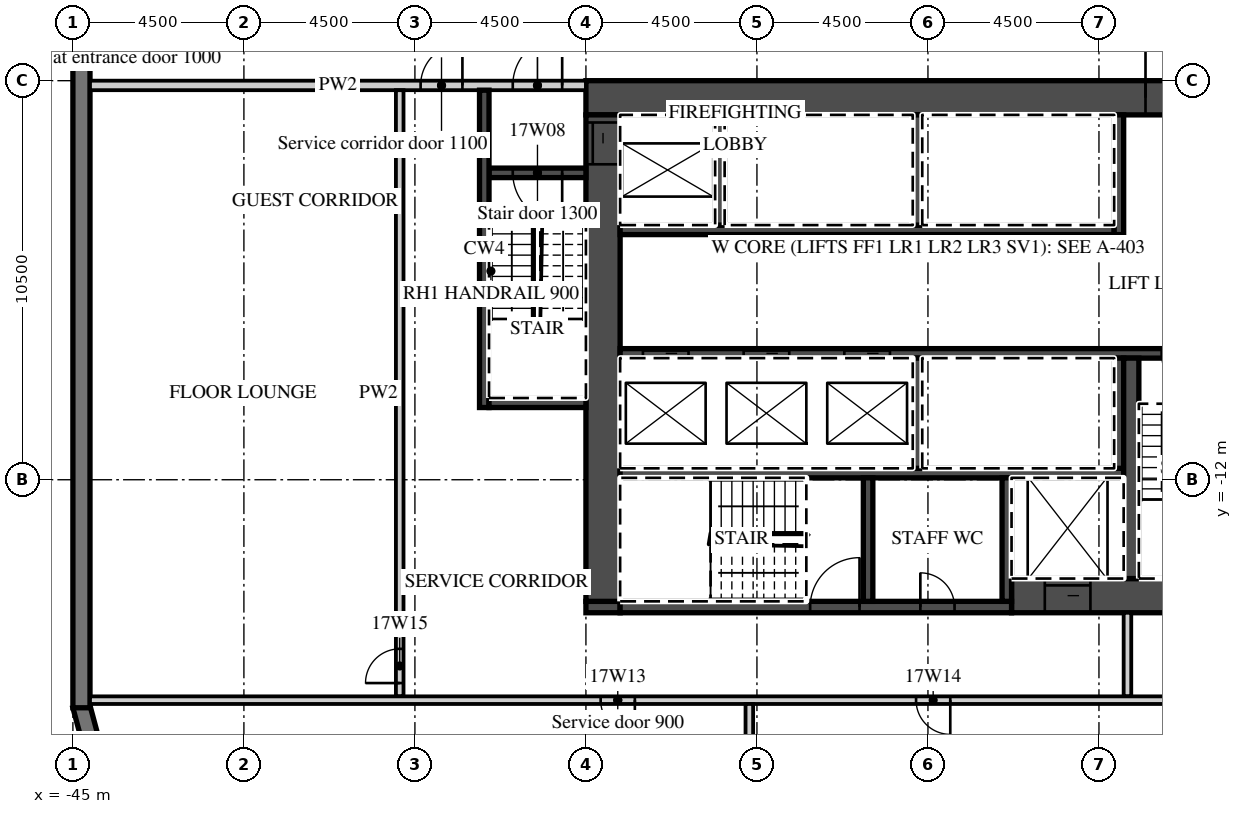
"""IFC4 building model, lengths in metres.
Left out: names, types, materials, properties, quantities, classifications, styles, units other than length and angle.
Written with IfcOpenShell. Run it as: python <this file> out.ifc"""

import sys

from ifc_helpers import new_model, si_unit, direction, frame, frame_2d, origin, place, context, subcontext, project, spatial, polyline, rectangle, outline, extrude, element, fill, save


model = new_model("IFC4")
c1 = context("Model", 3, precision=1e-05, world=origin(), true_north=direction((0.0, 1.0)))
c2 = subcontext(c1, "Body", "Model", "MODEL_VIEW")
j1 = project(units=[si_unit("LENGTHUNIT", "METRE"), si_unit("PLANEANGLEUNIT", "RADIAN")], contexts=[c1])
p1 = place(None, origin())
s1 = spatial("IfcSite", under=j1, at=p1, CompositionType="ELEMENT")
p2 = place(p1, origin())
s2 = spatial("IfcBuilding", under=s1, at=p2, CompositionType="ELEMENT")
p3 = place(p2, frame((0.0, 0.0, 86.4)))
s3 = spatial("IfcBuildingStorey", under=s2, at=p3, CompositionType="ELEMENT", Elevation=86.4)
p4 = place(p3, frame((-44.783, -17.942, 0.0), z_axis=(0.0, 0.0, 1.0), x_axis=(0.25881466832, -0.965926999034, 0.0)))
e1 = element("IfcWall", 1, at=p4, inside=s3, PredefinedType="SOLIDWALL", context=c2, shape_type="SweptSolid", body=[
    extrude(outline(polyline([(0.0, -0.225), (2.071, -0.225), (1.95, 0.225), (0.121, 0.225), (0.0, -0.225)])), origin(), (0.0, 0.0, 1.0), 3.02),
])
p5 = place(p3, frame((-44.775, 18.0, 0.0), z_axis=(0.0, 0.0, 1.0), x_axis=(0.0, -1.0, 0.0)))
e2 = element("IfcWall", 2, at=p5, inside=s3, PredefinedType="SOLIDWALL", context=c2, shape_type="SweptSolid", body=[
    extrude(rectangle(XDim=36.0, YDim=0.45, at=frame_2d((18.0, 0.0))), origin(), (0.0, 0.0, 1.0), 3.02),
])
p6 = place(p5, frame((3.9, 0.0, 0.45)))
e3 = element("IfcOpeningElement", 3, at=p6, cuts=e2, PredefinedType="OPENING", context=c2, shape_type="SweptSolid", body=[
    extrude(rectangle(XDim=3.3, YDim=2.25, at=frame_2d((1.65, 1.125))), frame((0.0, 0.235, 0.0), z_axis=(0.0, -1.0, 0.0), x_axis=(1.0, 0.0, 0.0)), (0.0, 0.0, 1.0), 0.47),
])
p7 = place(p5, frame((8.4, 0.0, 0.45)))
e4 = element("IfcOpeningElement", 4, at=p7, cuts=e2, PredefinedType="OPENING", context=c2, shape_type="SweptSolid", body=[
    extrude(rectangle(XDim=3.3, YDim=2.25, at=frame_2d((1.65, 1.125))), frame((0.0, 0.235, 0.0), z_axis=(0.0, -1.0, 0.0), x_axis=(1.0, 0.0, 0.0)), (0.0, 0.0, 1.0), 0.47),
])
p8 = place(p5, frame((12.9, 0.0, 0.45)))
e5 = element("IfcOpeningElement", 5, at=p8, cuts=e2, PredefinedType="OPENING", context=c2, shape_type="SweptSolid", body=[
    extrude(rectangle(XDim=3.3, YDim=2.25, at=frame_2d((1.65, 1.125))), frame((0.0, 0.235, 0.0), z_axis=(0.0, -1.0, 0.0), x_axis=(1.0, 0.0, 0.0)), (0.0, 0.0, 1.0), 0.47),
])
p9 = place(p3, frame((-31.5, -1.95, 0.0), z_axis=(0.0, 0.0, 1.0), x_axis=(1.0, 0.0, 0.0)))
e6 = element("IfcWall", 6, at=p9, inside=s3, PredefinedType="SHEAR", context=c2, shape_type="SweptSolid", body=[
    extrude(rectangle(XDim=18.0, YDim=0.9, at=frame_2d((9.0, 0.0))), origin(), (0.0, 0.0, 1.0), 3.02),
])
p10 = place(p9, frame((14.725, 0.0, 0.0)))
e7 = element("IfcOpeningElement", 7, at=p10, cuts=e6, PredefinedType="OPENING", context=c2, shape_type="SweptSolid", body=[
    extrude(rectangle(XDim=1.8, YDim=2.1, at=frame_2d((0.9, 1.05))), frame((0.0, 0.46, 0.0), z_axis=(0.0, -1.0, 0.0), x_axis=(1.0, 0.0, 0.0)), (0.0, 0.0, 1.0), 0.92),
])
p11 = place(p3, frame((-20.3, -15.05, 0.0), z_axis=(0.0, 0.0, 1.0), x_axis=(1.0, 0.0, 0.0)))
e8 = element("IfcWall", 8, at=p11, inside=s3, PredefinedType="SHEAR", context=c2, shape_type="SweptSolid", body=[
    extrude(rectangle(XDim=6.8, YDim=0.9, at=frame_2d((3.4, 0.0))), origin(), (0.0, 0.0, 1.0), 3.02),
])
p12 = place(p11, frame((0.875, 0.0, 0.0)))
e9 = element("IfcOpeningElement", 9, at=p12, cuts=e8, PredefinedType="OPENING", context=c2, shape_type="SweptSolid", body=[
    extrude(rectangle(XDim=1.2, YDim=2.1, at=frame_2d((0.6, 1.05))), frame((0.0, 0.46, 0.0), z_axis=(0.0, -1.0, 0.0), x_axis=(1.0, 0.0, 0.0)), (0.0, 0.0, 1.0), 0.92),
])
p13 = place(p3, frame((-31.5, -15.35, 0.0), z_axis=(0.0, 0.0, 1.0), x_axis=(1.0, 0.0, 0.0)))
e10 = element("IfcWall", 10, at=p13, inside=s3, PredefinedType="SHEAR", context=c2, shape_type="SweptSolid", body=[
    extrude(rectangle(XDim=0.9, YDim=0.3, at=frame_2d((0.45, 0.0))), origin(), (0.0, 0.0, 1.0), 3.02),
])
p14 = place(p3, frame((-30.6, -15.35, 0.0), z_axis=(0.0, 0.0, 1.0), x_axis=(1.0, 0.0, 0.0)))
e11 = element("IfcWall", 11, at=p14, inside=s3, PredefinedType="SHEAR", context=c2, shape_type="SweptSolid", body=[
    extrude(rectangle(XDim=10.3, YDim=0.3, at=frame_2d((5.15, 0.0))), origin(), (0.0, 0.0, 1.0), 3.02),
])
p15 = place(p14, frame((5.0, 0.0, 0.0)))
e12 = element("IfcOpeningElement", 12, at=p15, cuts=e11, PredefinedType="OPENING", context=c2, shape_type="SweptSolid", body=[
    extrude(rectangle(XDim=1.3, YDim=2.1, at=frame_2d((0.65, 1.05))), frame((0.0, 0.16, 0.0), z_axis=(0.0, -1.0, 0.0), x_axis=(1.0, 0.0, 0.0)), (0.0, 0.0, 1.0), 0.32),
])
p16 = place(p14, frame((7.9, 0.0, 0.0)))
e13 = element("IfcOpeningElement", 13, at=p16, cuts=e11, PredefinedType="OPENING", context=c2, shape_type="SweptSolid", body=[
    extrude(rectangle(XDim=0.9, YDim=2.1, at=frame_2d((0.45, 1.05))), frame((0.0, 0.16, 0.0), z_axis=(0.0, -1.0, 0.0), x_axis=(1.0, 0.0, 0.0)), (0.0, 0.0, 1.0), 0.32),
])
p17 = place(p3, frame((-31.05, -15.2, 0.0), z_axis=(0.0, 0.0, 1.0), x_axis=(0.0, 1.0, 0.0)))
e14 = element("IfcWall", 14, at=p17, inside=s3, PredefinedType="SHEAR", context=c2, shape_type="SweptSolid", body=[
    extrude(rectangle(XDim=12.8, YDim=0.9, at=frame_2d((6.4, 0.0))), origin(), (0.0, 0.0, 1.0), 3.02),
])
p18 = place(p17, frame((11.5, 0.0, 0.0)))
e15 = element("IfcOpeningElement", 15, at=p18, cuts=e14, PredefinedType="OPENING", context=c2, shape_type="SweptSolid", body=[
    extrude(rectangle(XDim=1.1, YDim=2.1, at=frame_2d((0.55, 1.05))), frame((0.0, 0.46, 0.0), z_axis=(0.0, -1.0, 0.0), x_axis=(1.0, 0.0, 0.0)), (0.0, 0.0, 1.0), 0.92),
])
p19 = place(p3, frame((-30.6, -5.425, 0.0), z_axis=(0.0, 0.0, 1.0), x_axis=(1.0, 0.0, 0.0)))
e16 = element("IfcWall", 16, at=p19, inside=s3, PredefinedType="SHEAR", context=c2, shape_type="SweptSolid", body=[
    extrude(rectangle(XDim=13.0, YDim=0.25, at=frame_2d((6.5, 0.0))), origin(), (0.0, 0.0, 1.0), 3.02),
])
p20 = place(p3, frame((-17.475, -5.55, 0.0), z_axis=(0.0, 0.0, 1.0), x_axis=(0.0, 1.0, 0.0)))
e17 = element("IfcWall", 17, at=p20, inside=s3, PredefinedType="SHEAR", context=c2, shape_type="SweptSolid", body=[
    extrude(rectangle(XDim=3.15, YDim=0.25, at=frame_2d((1.575, 0.0))), origin(), (0.0, 0.0, 1.0), 3.02),
])
for number, where, z_axis, x_axis in (
    (18, (-27.975, -5.3, 0.0), (0.0, 0.0, 1.0), (0.0, 1.0, 0.0)),
    (19, (-22.775, -5.3, 0.0), (0.0, 0.0, 1.0), (0.0, 1.0, 0.0)),
):
    element("IfcWall", number, at=place(p3, frame(where, z_axis=z_axis, x_axis=x_axis)), inside=s3, PredefinedType="SHEAR", context=c2, shape_type="SweptSolid", body=[
        extrude(rectangle(XDim=2.9, YDim=0.25, at=frame_2d((1.45, 0.0))), origin(), (0.0, 0.0, 1.0), 3.02),
    ])
p21 = place(p3, frame((-30.6, -8.675, 0.0), z_axis=(0.0, 0.0, 1.0), x_axis=(1.0, 0.0, 0.0)))
e20 = element("IfcWall", 20, at=p21, inside=s3, PredefinedType="SHEAR", context=c2, shape_type="SweptSolid", body=[
    extrude(rectangle(XDim=16.2, YDim=0.25, at=frame_2d((8.1, 0.0))), origin(), (0.0, 0.0, 1.0), 3.02),
])
p22 = place(p21, frame((0.6, 0.0, 0.0)))
e21 = element("IfcOpeningElement", 21, at=p22, cuts=e20, PredefinedType="OPENING", context=c2, shape_type="SweptSolid", body=[
    extrude(rectangle(XDim=1.2, YDim=2.1, at=frame_2d((0.6, 1.05))), frame((0.0, 0.135, 0.0), z_axis=(0.0, -1.0, 0.0), x_axis=(1.0, 0.0, 0.0)), (0.0, 0.0, 1.0), 0.27),
])
p23 = place(p21, frame((3.25, 0.0, 0.0)))
e22 = element("IfcOpeningElement", 22, at=p23, cuts=e20, PredefinedType="OPENING", context=c2, shape_type="SweptSolid", body=[
    extrude(rectangle(XDim=1.2, YDim=2.1, at=frame_2d((0.6, 1.05))), frame((0.0, 0.135, 0.0), z_axis=(0.0, -1.0, 0.0), x_axis=(1.0, 0.0, 0.0)), (0.0, 0.0, 1.0), 0.27),
])
p24 = place(p21, frame((5.9, 0.0, 0.0)))
e23 = element("IfcOpeningElement", 23, at=p24, cuts=e20, PredefinedType="OPENING", context=c2, shape_type="SweptSolid", body=[
    extrude(rectangle(XDim=1.2, YDim=2.1, at=frame_2d((0.6, 1.05))), frame((0.0, 0.135, 0.0), z_axis=(0.0, -1.0, 0.0), x_axis=(1.0, 0.0, 0.0)), (0.0, 0.0, 1.0), 0.27),
])
p25 = place(p21, frame((14.25, 0.0, 0.0)))
e24 = element("IfcOpeningElement", 24, at=p25, cuts=e20, PredefinedType="OPENING", context=c2, shape_type="SweptSolid", body=[
    extrude(rectangle(XDim=1.3, YDim=2.1, at=frame_2d((0.65, 1.05))), frame((0.0, 0.135, 0.0), z_axis=(0.0, -1.0, 0.0), x_axis=(1.0, 0.0, 0.0)), (0.0, 0.0, 1.0), 0.27),
])
p26 = place(p3, frame((-30.6, -11.825, 0.0), z_axis=(0.0, 0.0, 1.0), x_axis=(1.0, 0.0, 0.0)))
e25 = element("IfcWall", 25, at=p26, inside=s3, PredefinedType="SHEAR", context=c2, shape_type="SweptSolid", body=[
    extrude(rectangle(XDim=13.25, YDim=0.25, at=frame_2d((6.625, 0.0))), origin(), (0.0, 0.0, 1.0), 3.02),
])
for number, where, z_axis, x_axis in (
    (26, (-17.475, -11.7, 0.0), (0.0, 0.0, 1.0), (0.0, 1.0, 0.0)),
    (27, (-22.775, -11.7, 0.0), (0.0, 0.0, 1.0), (0.0, 1.0, 0.0)),
):
    element("IfcWall", number, at=place(p3, frame(where, z_axis=z_axis, x_axis=x_axis)), inside=s3, PredefinedType="SHEAR", context=c2, shape_type="SweptSolid", body=[
        extrude(rectangle(XDim=2.9, YDim=0.25, at=frame_2d((1.45, 0.0))), origin(), (0.0, 0.0, 1.0), 3.02),
    ])
p27 = place(p3, frame((-17.15, -14.6, 0.0), z_axis=(0.0, 0.0, 1.0), x_axis=(0.0, 1.0, 0.0)))
e28 = element("IfcWall", 28, at=p27, inside=s3, PredefinedType="SHEAR", context=c2, shape_type="SweptSolid", body=[
    extrude(rectangle(XDim=5.8, YDim=0.4, at=frame_2d((2.9, 0.0))), origin(), (0.0, 0.0, 1.0), 3.02),
])
for number, where, z_axis, x_axis in (
    (29, (-20.425, -15.2, 0.0), (0.0, 0.0, 1.0), (0.0, 1.0, 0.0)),
    (30, (-24.075, -15.2, 0.0), (0.0, 0.0, 1.0), (0.0, 1.0, 0.0)),
):
    element("IfcWall", number, at=place(p3, frame(where, z_axis=z_axis, x_axis=x_axis)), inside=s3, PredefinedType="SHEAR", context=c2, shape_type="SweptSolid", body=[
        extrude(rectangle(XDim=3.25, YDim=0.25, at=frame_2d((1.625, 0.0))), origin(), (0.0, 0.0, 1.0), 3.02),
    ])
p28 = place(p3, frame((-44.55, -1.625, 0.0), z_axis=(0.0, 0.0, 1.0), x_axis=(1.0, 0.0, 0.0)))
e31 = element("IfcWall", 31, at=p28, inside=s3, PredefinedType="PARTITIONING", context=c2, shape_type="SweptSolid", body=[
    extrude(rectangle(XDim=13.05, YDim=0.25, at=frame_2d((6.525, 0.0))), origin(), (0.0, 0.0, 1.0), 3.02),
])
p29 = place(p28, frame((11.125, 0.0, 0.0)))
e32 = element("IfcOpeningElement", 32, at=p29, cuts=e31, PredefinedType="OPENING", context=c2, shape_type="SweptSolid", body=[
    extrude(rectangle(XDim=1.3, YDim=2.1, at=frame_2d((0.65, 1.05))), frame((0.0, 0.135, 0.0), z_axis=(0.0, -1.0, 0.0), x_axis=(1.0, 0.0, 0.0)), (0.0, 0.0, 1.0), 0.27),
])
p30 = place(p28, frame((8.7, 0.0, 0.0)))
e33 = element("IfcOpeningElement", 33, at=p30, cuts=e31, PredefinedType="OPENING", context=c2, shape_type="SweptSolid", body=[
    extrude(rectangle(XDim=1.1, YDim=2.1, at=frame_2d((0.55, 1.05))), frame((0.0, 0.135, 0.0), z_axis=(0.0, -1.0, 0.0), x_axis=(1.0, 0.0, 0.0)), (0.0, 0.0, 1.0), 0.27),
])
p31 = place(p3, frame((-34.05, -3.925, 0.0), z_axis=(0.0, 0.0, 1.0), x_axis=(1.0, 0.0, 0.0)))
e34 = element("IfcWall", 34, at=p31, inside=s3, PredefinedType="SHEAR", context=c2, shape_type="SweptSolid", body=[
    extrude(rectangle(XDim=2.55, YDim=0.25, at=frame_2d((1.275, 0.0))), origin(), (0.0, 0.0, 1.0), 3.02),
])
p32 = place(p31, frame((0.625, 0.0, 0.0)))
e35 = element("IfcOpeningElement", 35, at=p32, cuts=e34, PredefinedType="OPENING", context=c2, shape_type="SweptSolid", body=[
    extrude(rectangle(XDim=1.3, YDim=2.1, at=frame_2d((0.65, 1.05))), frame((0.0, 0.135, 0.0), z_axis=(0.0, -1.0, 0.0), x_axis=(1.0, 0.0, 0.0)), (0.0, 0.0, 1.0), 0.27),
])
p33 = place(p3, frame((-34.175, -10.1, 0.0), z_axis=(0.0, 0.0, 1.0), x_axis=(0.0, 1.0, 0.0)))
e36 = element("IfcWall", 36, at=p33, inside=s3, PredefinedType="SHEAR", context=c2, shape_type="SweptSolid", body=[
    extrude(rectangle(XDim=8.35, YDim=0.25, at=frame_2d((4.175, 0.0))), origin(), (0.0, 0.0, 1.0), 3.02),
])
p34 = place(p3, frame((-34.05, -9.975, 0.0), z_axis=(0.0, 0.0, 1.0), x_axis=(1.0, 0.0, 0.0)))
e37 = element("IfcWall", 37, at=p34, inside=s3, PredefinedType="SHEAR", context=c2, shape_type="SweptSolid", body=[
    extrude(rectangle(XDim=2.55, YDim=0.25, at=frame_2d((1.275, 0.0))), origin(), (0.0, 0.0, 1.0), 3.02),
])
p35 = place(p3, frame((-17.25, -17.7, 0.0), z_axis=(0.0, 0.0, 1.0), x_axis=(0.0, 1.0, 0.0)))
e38 = element("IfcWall", 38, at=p35, inside=s3, PredefinedType="PARTITIONING", context=c2, shape_type="SweptSolid", body=[
    extrude(rectangle(XDim=2.2, YDim=0.2, at=frame_2d((1.1, 0.0))), origin(), (0.0, 0.0, 1.0), 3.02),
])
p36 = place(p3, frame((-36.4, -17.7, 0.0), z_axis=(0.0, 0.0, 1.0), x_axis=(0.0, 1.0, 0.0)))
e39 = element("IfcWall", 39, at=p36, inside=s3, PredefinedType="PARTITIONING", context=c2, shape_type="SweptSolid", body=[
    extrude(rectangle(XDim=15.95, YDim=0.2, at=frame_2d((7.975, 0.0))), origin(), (0.0, 0.0, 1.0), 3.02),
])
p37 = place(p36, frame((0.35, 0.0, 0.0)))
e40 = element("IfcOpeningElement", 40, at=p37, cuts=e39, PredefinedType="OPENING", context=c2, shape_type="SweptSolid", body=[
    extrude(rectangle(XDim=0.9, YDim=2.1, at=frame_2d((0.45, 1.05))), frame((0.0, 0.11, 0.0), z_axis=(0.0, -1.0, 0.0), x_axis=(1.0, 0.0, 0.0)), (0.0, 0.0, 1.0), 0.22),
])
p38 = place(p3, frame((-44.55, -17.8, 0.0), z_axis=(0.0, 0.0, 1.0), x_axis=(1.0, 0.0, 0.0)))
e41 = element("IfcWall", 41, at=p38, inside=s3, PredefinedType="PARTITIONING", context=c2, shape_type="SweptSolid", body=[
    extrude(rectangle(XDim=30.95, YDim=0.2, at=frame_2d((15.475, 0.0))), origin(), (0.0, 0.0, 1.0), 3.02),
])
p39 = place(p38, frame((13.438, 0.0, 0.0)))
e42 = element("IfcOpeningElement", 42, at=p39, cuts=e41, PredefinedType="OPENING", context=c2, shape_type="SweptSolid", body=[
    extrude(rectangle(XDim=0.9, YDim=2.1, at=frame_2d((0.45, 1.05))), frame((0.0, 0.11, 0.0), z_axis=(0.0, -1.0, 0.0), x_axis=(1.0, 0.0, 0.0)), (0.0, 0.0, 1.0), 0.22),
])
p40 = place(p38, frame((21.738, 0.0, 0.0)))
e43 = element("IfcOpeningElement", 43, at=p40, cuts=e41, PredefinedType="OPENING", context=c2, shape_type="SweptSolid", body=[
    extrude(rectangle(XDim=0.9, YDim=2.1, at=frame_2d((0.45, 1.05))), frame((0.0, 0.11, 0.0), z_axis=(0.0, -1.0, 0.0), x_axis=(1.0, 0.0, 0.0)), (0.0, 0.0, 1.0), 0.22),
])
p41 = place(p3, frame((-27.2, -21.55, 0.0), z_axis=(0.0, 0.0, 1.0), x_axis=(0.0, 1.0, 0.0)))
e44 = element("IfcWall", 44, at=p41, inside=s3, PredefinedType="PARTITIONING", context=c2, shape_type="SweptSolid", body=[
    extrude(rectangle(XDim=3.65, YDim=0.2, at=frame_2d((1.825, 0.0))), origin(), (0.0, 0.0, 1.0), 3.02),
])
p42 = place(p22, origin())
e45 = element("IfcDoor", 45, at=p42, inside=s3, OperationType="SLIDING_TO_LEFT", PredefinedType="DOOR", context=c2, shape_type="SweptSolid", body=[
    extrude(rectangle(XDim=1.2, YDim=2.1, at=frame_2d((0.6, 1.05))), frame((0.0, 0.025, 0.0), z_axis=(0.0, -1.0, 0.0), x_axis=(1.0, 0.0, 0.0)), (0.0, 0.0, 1.0), 0.05),
])
fill(e21, e45)
p43 = place(p23, origin())
e46 = element("IfcDoor", 46, at=p43, inside=s3, OperationType="SLIDING_TO_RIGHT", PredefinedType="DOOR", context=c2, shape_type="SweptSolid", body=[
    extrude(rectangle(XDim=1.2, YDim=2.1, at=frame_2d((0.6, 1.05))), frame((0.0, 0.025, 0.0), z_axis=(0.0, -1.0, 0.0), x_axis=(1.0, 0.0, 0.0)), (0.0, 0.0, 1.0), 0.05),
])
fill(e22, e46)
p44 = place(p24, origin())
e47 = element("IfcDoor", 47, at=p44, inside=s3, OperationType="SLIDING_TO_RIGHT", PredefinedType="DOOR", context=c2, shape_type="SweptSolid", body=[
    extrude(rectangle(XDim=1.2, YDim=2.1, at=frame_2d((0.6, 1.05))), frame((0.0, 0.025, 0.0), z_axis=(0.0, -1.0, 0.0), x_axis=(1.0, 0.0, 0.0)), (0.0, 0.0, 1.0), 0.05),
])
fill(e23, e47)
p45 = place(p12, origin())
e48 = element("IfcDoor", 48, at=p45, inside=s3, OperationType="SLIDING_TO_LEFT", PredefinedType="DOOR", context=c2, shape_type="SweptSolid", body=[
    extrude(rectangle(XDim=1.2, YDim=2.1, at=frame_2d((0.6, 1.05))), frame((0.0, 0.025, 0.0), z_axis=(0.0, -1.0, 0.0), x_axis=(1.0, 0.0, 0.0)), (0.0, 0.0, 1.0), 0.05),
])
fill(e9, e48)
p46 = place(p18, origin())
e49 = element("IfcDoor", 49, at=p46, inside=s3, OperationType="SLIDING_TO_RIGHT", PredefinedType="DOOR", context=c2, shape_type="SweptSolid", body=[
    extrude(rectangle(XDim=1.1, YDim=2.1, at=frame_2d((0.55, 1.05))), frame((0.0, 0.025, 0.0), z_axis=(0.0, -1.0, 0.0), x_axis=(1.0, 0.0, 0.0)), (0.0, 0.0, 1.0), 0.05),
])
fill(e15, e49)
p47 = place(p10, origin())
e50 = element("IfcDoor", 50, at=p47, inside=s3, OperationType="DOUBLE_DOOR_DOUBLE_SWING", PredefinedType="DOOR", context=c2, shape_type="SweptSolid", body=[
    extrude(rectangle(XDim=1.8, YDim=2.1, at=frame_2d((0.9, 1.05))), frame((0.0, 0.025, 0.0), z_axis=(0.0, -1.0, 0.0), x_axis=(1.0, 0.0, 0.0)), (0.0, 0.0, 1.0), 0.05),
])
fill(e7, e50)
p48 = place(p29, origin())
e51 = element("IfcDoor", 51, at=p48, inside=s3, OperationType="SINGLE_SWING_RIGHT", PredefinedType="DOOR", context=c2, shape_type="SweptSolid", body=[
    extrude(rectangle(XDim=1.3, YDim=2.1, at=frame_2d((0.65, 1.05))), frame((0.0, 0.025, 0.0), z_axis=(0.0, -1.0, 0.0), x_axis=(1.0, 0.0, 0.0)), (0.0, 0.0, 1.0), 0.05),
])
fill(e32, e51)
p49 = place(p32, origin())
e52 = element("IfcDoor", 52, at=p49, inside=s3, OperationType="SINGLE_SWING_RIGHT", PredefinedType="DOOR", context=c2, shape_type="SweptSolid", body=[
    extrude(rectangle(XDim=1.3, YDim=2.1, at=frame_2d((0.65, 1.05))), frame((0.0, 0.025, 0.0), z_axis=(0.0, -1.0, 0.0), x_axis=(1.0, 0.0, 0.0)), (0.0, 0.0, 1.0), 0.05),
])
fill(e35, e52)
p50 = place(p30, origin())
e53 = element("IfcDoor", 53, at=p50, inside=s3, OperationType="SINGLE_SWING_RIGHT", PredefinedType="DOOR", context=c2, shape_type="SweptSolid", body=[
    extrude(rectangle(XDim=1.1, YDim=2.1, at=frame_2d((0.55, 1.05))), frame((0.0, 0.025, 0.0), z_axis=(0.0, -1.0, 0.0), x_axis=(1.0, 0.0, 0.0)), (0.0, 0.0, 1.0), 0.05),
])
fill(e33, e53)
p51 = place(p25, origin())
e54 = element("IfcDoor", 54, at=p51, inside=s3, OperationType="SINGLE_SWING_RIGHT", PredefinedType="DOOR", context=c2, shape_type="SweptSolid", body=[
    extrude(rectangle(XDim=1.3, YDim=2.1, at=frame_2d((0.65, 1.05))), frame((0.0, 0.025, 0.0), z_axis=(0.0, -1.0, 0.0), x_axis=(1.0, 0.0, 0.0)), (0.0, 0.0, 1.0), 0.05),
])
fill(e24, e54)
p52 = place(p15, origin())
e55 = element("IfcDoor", 55, at=p52, inside=s3, OperationType="SINGLE_SWING_RIGHT", PredefinedType="DOOR", context=c2, shape_type="SweptSolid", body=[
    extrude(rectangle(XDim=1.3, YDim=2.1, at=frame_2d((0.65, 1.05))), frame((0.0, 0.025, 0.0), z_axis=(0.0, -1.0, 0.0), x_axis=(1.0, 0.0, 0.0)), (0.0, 0.0, 1.0), 0.05),
])
fill(e12, e55)
p53 = place(p16, origin())
e56 = element("IfcDoor", 56, at=p53, inside=s3, OperationType="SINGLE_SWING_LEFT", PredefinedType="DOOR", context=c2, shape_type="SweptSolid", body=[
    extrude(rectangle(XDim=0.9, YDim=2.1, at=frame_2d((0.45, 1.05))), frame((0.0, 0.025, 0.0), z_axis=(0.0, -1.0, 0.0), x_axis=(1.0, 0.0, 0.0)), (0.0, 0.0, 1.0), 0.05),
])
fill(e13, e56)
p54 = place(p39, origin())
e57 = element("IfcDoor", 57, at=p54, inside=s3, OperationType="SINGLE_SWING_RIGHT", PredefinedType="DOOR", context=c2, shape_type="SweptSolid", body=[
    extrude(rectangle(XDim=0.9, YDim=2.1, at=frame_2d((0.45, 1.05))), frame((0.0, 0.025, 0.0), z_axis=(0.0, -1.0, 0.0), x_axis=(1.0, 0.0, 0.0)), (0.0, 0.0, 1.0), 0.05),
])
fill(e42, e57)
p55 = place(p40, origin())
e58 = element("IfcDoor", 58, at=p55, inside=s3, OperationType="SINGLE_SWING_RIGHT", PredefinedType="DOOR", context=c2, shape_type="SweptSolid", body=[
    extrude(rectangle(XDim=0.9, YDim=2.1, at=frame_2d((0.45, 1.05))), frame((0.0, 0.025, 0.0), z_axis=(0.0, -1.0, 0.0), x_axis=(1.0, 0.0, 0.0)), (0.0, 0.0, 1.0), 0.05),
])
fill(e43, e58)
p56 = place(p37, origin())
e59 = element("IfcDoor", 59, at=p56, inside=s3, OperationType="SINGLE_SWING_LEFT", PredefinedType="DOOR", context=c2, shape_type="SweptSolid", body=[
    extrude(rectangle(XDim=0.9, YDim=2.1, at=frame_2d((0.45, 1.05))), frame((0.0, 0.025, 0.0), z_axis=(0.0, -1.0, 0.0), x_axis=(1.0, 0.0, 0.0)), (0.0, 0.0, 1.0), 0.05),
])
fill(e40, e59)
save(model, sys.argv[1])
